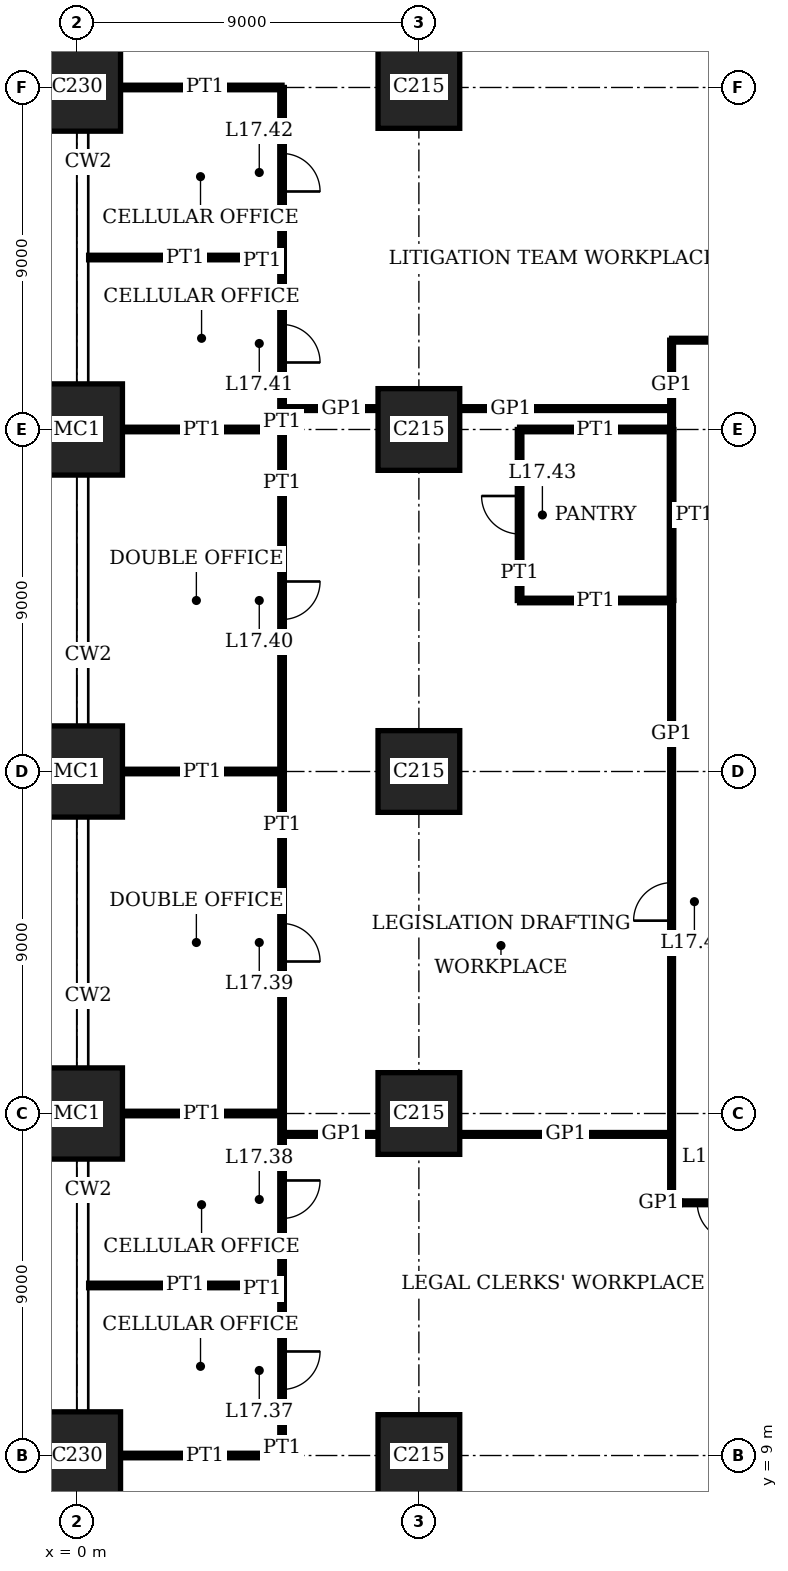
"""IFC4 building model, lengths in metres.
Left out: names, types, materials, properties, quantities, classifications, styles, units other than length and angle.
Written with IfcOpenShell. Run it as: python <this file> out.ifc"""

import sys

from ifc_helpers import new_model, si_unit, direction, frame, frame_2d, origin, origin_2d, place, context, subcontext, project, spatial, rectangle, extrude, element, fill, save


model = new_model("IFC4")
c1 = context("Model", 3, precision=1e-05, world=origin(), true_north=direction((0.0, 1.0)))
c2 = subcontext(c1, "Body", "Model", "MODEL_VIEW")
j1 = project(units=[si_unit("LENGTHUNIT", "METRE"), si_unit("PLANEANGLEUNIT", "RADIAN")], contexts=[c1])
p1 = place(None, origin())
s1 = spatial("IfcSite", under=j1, at=p1, CompositionType="ELEMENT")
p2 = place(p1, origin())
s2 = spatial("IfcBuilding", under=s1, at=p2, CompositionType="ELEMENT")
p3 = place(p2, frame((0.0, 0.0, 71.8)))
s3 = spatial("IfcBuildingStorey", under=s2, at=p3, CompositionType="ELEMENT", Elevation=71.8)
p4 = place(p3, frame((0.0, 9.0, 0.0), z_axis=(0.0, 0.0, 1.0), x_axis=(1.0, 0.0, 0.0)))
e1 = element("IfcColumn", 1, at=p4, inside=s3, PredefinedType="COLUMN", context=c2, shape_type="SweptSolid", body=[
    extrude(rectangle(XDim=2.3, YDim=2.3, at=origin_2d()), origin(), (0.0, 0.0, 1.0), 4.0),
])
for number, where, z_axis, x_axis in (
    (2, (0.0, 18.0, 0.0), (0.0, 0.0, 1.0), (1.0, 0.0, 0.0)),
    (3, (0.0, 27.0, 0.0), (0.0, 0.0, 1.0), (1.0, 0.0, 0.0)),
    (4, (0.0, 36.0, 0.0), (0.0, 0.0, 1.0), (1.0, 0.0, 0.0)),
):
    element("IfcColumn", number, at=place(p3, frame(where, z_axis=z_axis, x_axis=x_axis)), inside=s3, PredefinedType="COLUMN", context=c2, shape_type="SweptSolid", body=[
        extrude(rectangle(XDim=2.4, YDim=2.4, at=origin_2d()), origin(), (0.0, 0.0, 1.0), 4.0),
    ])
p5 = place(p3, frame((0.0, 45.0, 0.0), z_axis=(0.0, 0.0, 1.0), x_axis=(1.0, 0.0, 0.0)))
e5 = element("IfcColumn", 5, at=p5, inside=s3, PredefinedType="COLUMN", context=c2, shape_type="SweptSolid", body=[
    extrude(rectangle(XDim=2.3, YDim=2.3, at=origin_2d()), origin(), (0.0, 0.0, 1.0), 4.0),
])
for number, where, z_axis, x_axis in (
    (6, (9.0, 9.0, 0.0), (0.0, 0.0, 1.0), (1.0, 0.0, 0.0)),
    (7, (9.0, 18.0, 0.0), (0.0, 0.0, 1.0), (1.0, 0.0, 0.0)),
    (8, (9.0, 27.0, 0.0), (0.0, 0.0, 1.0), (1.0, 0.0, 0.0)),
    (9, (9.0, 36.0, 0.0), (0.0, 0.0, 1.0), (1.0, 0.0, 0.0)),
    (10, (9.0, 45.0, 0.0), (0.0, 0.0, 1.0), (1.0, 0.0, 0.0)),
):
    element("IfcColumn", number, at=place(p3, frame(where, z_axis=z_axis, x_axis=x_axis)), inside=s3, PredefinedType="COLUMN", context=c2, shape_type="SweptSolid", body=[
        extrude(rectangle(XDim=2.15, YDim=2.15, at=origin_2d()), origin(), (0.0, 0.0, 1.0), 4.0),
    ])
p6 = place(p3, frame((1.15, 9.0, 0.0), z_axis=(0.0, 0.0, 1.0), x_axis=(1.0, 0.0, 0.0)))
e11 = element("IfcWall", 11, at=p6, inside=s3, PredefinedType="PARTITIONING", context=c2, shape_type="SweptSolid", body=[
    extrude(rectangle(XDim=4.25, YDim=0.12, at=frame_2d((2.125, 0.0))), origin(), (0.0, 0.0, 1.0), 3.05),
])
p7 = place(p3, frame((0.31, 13.475, 0.0), z_axis=(0.0, 0.0, 1.0), x_axis=(1.0, 0.0, 0.0)))
e12 = element("IfcWall", 12, at=p7, inside=s3, PredefinedType="PARTITIONING", context=c2, shape_type="SweptSolid", body=[
    extrude(rectangle(XDim=5.09, YDim=0.12, at=frame_2d((2.545, 0.0))), origin(), (0.0, 0.0, 1.0), 3.1),
])
p8 = place(p3, frame((15.65, 15.65, 0.0), z_axis=(0.0, 0.0, 1.0), x_axis=(1.0, 0.0, 0.0)))
e13 = element("IfcWall", 13, at=p8, inside=s3, PredefinedType="PARTITIONING", context=c2, shape_type="SweptSolid", body=[
    extrude(rectangle(XDim=2.35, YDim=0.1, at=frame_2d((1.175, 0.0))), origin(), (0.0, 0.0, 1.0), 3.75),
])
p9 = place(p8, frame((0.675, 0.0, 0.0)))
e14 = element("IfcOpeningElement", 14, at=p9, cuts=e13, PredefinedType="OPENING", context=c2, shape_type="SweptSolid", body=[
    extrude(rectangle(XDim=1.0, YDim=2.4, at=frame_2d((0.5, 1.2))), frame((0.0, 0.06, 0.0), z_axis=(0.0, -1.0, 0.0), x_axis=(1.0, 0.0, 0.0)), (0.0, 0.0, 1.0), 0.12),
])
p10 = place(p3, frame((5.39, 17.45, 0.0), z_axis=(0.0, 0.0, 1.0), x_axis=(1.0, 0.0, 0.0)))
e15 = element("IfcWall", 15, at=p10, inside=s3, PredefinedType="PARTITIONING", context=c2, shape_type="SweptSolid", body=[
    extrude(rectangle(XDim=2.535, YDim=0.1, at=frame_2d((1.268, 0.0))), origin(), (0.0, 0.0, 1.0), 3.05),
])
p11 = place(p3, frame((10.075, 17.45, 0.0), z_axis=(0.0, 0.0, 1.0), x_axis=(1.0, 0.0, 0.0)))
e16 = element("IfcWall", 16, at=p11, inside=s3, PredefinedType="PARTITIONING", context=c2, shape_type="SweptSolid", body=[
    extrude(rectangle(XDim=5.575, YDim=0.1, at=frame_2d((2.788, 0.0))), origin(), (0.0, 0.0, 1.0), 3.05),
])
for number, where, z_axis, x_axis in (
    (17, (1.2, 18.0, 0.0), (0.0, 0.0, 1.0), (1.0, 0.0, 0.0)),
    (18, (1.2, 27.0, 0.0), (0.0, 0.0, 1.0), (1.0, 0.0, 0.0)),
):
    element("IfcWall", number, at=place(p3, frame(where, z_axis=z_axis, x_axis=x_axis)), inside=s3, PredefinedType="PARTITIONING", context=c2, shape_type="SweptSolid", body=[
        extrude(rectangle(XDim=4.2, YDim=0.12, at=frame_2d((2.1, 0.0))), origin(), (0.0, 0.0, 1.0), 3.05),
    ])
p12 = place(p3, frame((11.65, 31.5, 0.0), z_axis=(0.0, 0.0, 1.0), x_axis=(1.0, 0.0, 0.0)))
e19 = element("IfcWall", 19, at=p12, inside=s3, PredefinedType="PARTITIONING", context=c2, shape_type="SweptSolid", body=[
    extrude(rectangle(XDim=4.0, YDim=0.12, at=frame_2d((2.0, 0.0))), origin(), (0.0, 0.0, 1.0), 3.1),
])
p13 = place(p3, frame((1.2, 36.0, 0.0), z_axis=(0.0, 0.0, 1.0), x_axis=(1.0, 0.0, 0.0)))
e20 = element("IfcWall", 20, at=p13, inside=s3, PredefinedType="PARTITIONING", context=c2, shape_type="SweptSolid", body=[
    extrude(rectangle(XDim=4.2, YDim=0.12, at=frame_2d((2.1, 0.0))), origin(), (0.0, 0.0, 1.0), 3.05),
])
p14 = place(p3, frame((11.65, 36.0, 0.0), z_axis=(0.0, 0.0, 1.0), x_axis=(1.0, 0.0, 0.0)))
e21 = element("IfcWall", 21, at=p14, inside=s3, PredefinedType="PARTITIONING", context=c2, shape_type="SweptSolid", body=[
    extrude(rectangle(XDim=4.0, YDim=0.12, at=frame_2d((2.0, 0.0))), origin(), (0.0, 0.0, 1.0), 3.05),
])
p15 = place(p3, frame((5.39, 36.55, 0.0), z_axis=(0.0, 0.0, 1.0), x_axis=(1.0, 0.0, 0.0)))
e22 = element("IfcWall", 22, at=p15, inside=s3, PredefinedType="PARTITIONING", context=c2, shape_type="SweptSolid", body=[
    extrude(rectangle(XDim=2.535, YDim=0.1, at=frame_2d((1.268, 0.0))), origin(), (0.0, 0.0, 1.0), 3.05),
])
p16 = place(p3, frame((10.075, 36.55, 0.0), z_axis=(0.0, 0.0, 1.0), x_axis=(1.0, 0.0, 0.0)))
e23 = element("IfcWall", 23, at=p16, inside=s3, PredefinedType="PARTITIONING", context=c2, shape_type="SweptSolid", body=[
    extrude(rectangle(XDim=5.575, YDim=0.1, at=frame_2d((2.788, 0.0))), origin(), (0.0, 0.0, 1.0), 3.05),
])
p17 = place(p3, frame((15.65, 38.35, 0.0), z_axis=(0.0, 0.0, 1.0), x_axis=(1.0, 0.0, 0.0)))
e24 = element("IfcWall", 24, at=p17, inside=s3, PredefinedType="PARTITIONING", context=c2, shape_type="SweptSolid", body=[
    extrude(rectangle(XDim=15.85, YDim=0.1, at=frame_2d((7.925, 0.0))), origin(), (0.0, 0.0, 1.0), 3.75),
])
p18 = place(p17, frame((7.425, 0.0, 0.0)))
e25 = element("IfcOpeningElement", 25, at=p18, cuts=e24, PredefinedType="OPENING", context=c2, shape_type="SweptSolid", body=[
    extrude(rectangle(XDim=1.0, YDim=2.4, at=frame_2d((0.5, 1.2))), frame((0.0, 0.06, 0.0), z_axis=(0.0, -1.0, 0.0), x_axis=(1.0, 0.0, 0.0)), (0.0, 0.0, 1.0), 0.12),
])
p19 = place(p3, frame((0.31, 40.525, 0.0), z_axis=(0.0, 0.0, 1.0), x_axis=(1.0, 0.0, 0.0)))
e26 = element("IfcWall", 26, at=p19, inside=s3, PredefinedType="PARTITIONING", context=c2, shape_type="SweptSolid", body=[
    extrude(rectangle(XDim=5.09, YDim=0.12, at=frame_2d((2.545, 0.0))), origin(), (0.0, 0.0, 1.0), 3.1),
])
p20 = place(p3, frame((1.15, 45.0, 0.0), z_axis=(0.0, 0.0, 1.0), x_axis=(1.0, 0.0, 0.0)))
e27 = element("IfcWall", 27, at=p20, inside=s3, PredefinedType="PARTITIONING", context=c2, shape_type="SweptSolid", body=[
    extrude(rectangle(XDim=4.25, YDim=0.12, at=frame_2d((2.125, 0.0))), origin(), (0.0, 0.0, 1.0), 3.05),
])
p21 = place(p3, frame((5.4, 9.0, 0.0), z_axis=(0.0, 0.0, 1.0), x_axis=(0.0, 1.0, 0.0)))
e28 = element("IfcWall", 28, at=p21, inside=s3, PredefinedType="PARTITIONING", context=c2, shape_type="SweptSolid", body=[
    extrude(rectangle(XDim=4.475, YDim=0.12, at=frame_2d((2.238, 0.0))), origin(), (0.0, 0.0, 1.0), 3.75),
])
p22 = place(p21, frame((1.738, 0.0, 0.0)))
e29 = element("IfcOpeningElement", 29, at=p22, cuts=e28, PredefinedType="OPENING", context=c2, shape_type="SweptSolid", body=[
    extrude(rectangle(XDim=1.0, YDim=2.4, at=frame_2d((0.5, 1.2))), frame((0.0, 0.07, 0.0), z_axis=(0.0, -1.0, 0.0), x_axis=(1.0, 0.0, 0.0)), (0.0, 0.0, 1.0), 0.14),
])
p23 = place(p3, frame((5.4, 13.475, 0.0), z_axis=(0.0, 0.0, 1.0), x_axis=(0.0, 1.0, 0.0)))
e30 = element("IfcWall", 30, at=p23, inside=s3, PredefinedType="PARTITIONING", context=c2, shape_type="SweptSolid", body=[
    extrude(rectangle(XDim=4.525, YDim=0.12, at=frame_2d((2.262, 0.0))), origin(), (0.0, 0.0, 1.0), 3.75),
])
p24 = place(p23, frame((1.763, 0.0, 0.0)))
e31 = element("IfcOpeningElement", 31, at=p24, cuts=e30, PredefinedType="OPENING", context=c2, shape_type="SweptSolid", body=[
    extrude(rectangle(XDim=1.0, YDim=2.4, at=frame_2d((0.5, 1.2))), frame((0.0, 0.07, 0.0), z_axis=(0.0, -1.0, 0.0), x_axis=(1.0, 0.0, 0.0)), (0.0, 0.0, 1.0), 0.14),
])
p25 = place(p3, frame((5.4, 18.0, 0.0), z_axis=(0.0, 0.0, 1.0), x_axis=(0.0, 1.0, 0.0)))
e32 = element("IfcWall", 32, at=p25, inside=s3, PredefinedType="PARTITIONING", context=c2, shape_type="SweptSolid", body=[
    extrude(rectangle(XDim=9.0, YDim=0.12, at=frame_2d((4.5, 0.0))), origin(), (0.0, 0.0, 1.0), 3.75),
])
p26 = place(p25, frame((4.0, 0.0, 0.0)))
e33 = element("IfcOpeningElement", 33, at=p26, cuts=e32, PredefinedType="OPENING", context=c2, shape_type="SweptSolid", body=[
    extrude(rectangle(XDim=1.0, YDim=2.4, at=frame_2d((0.5, 1.2))), frame((0.0, 0.07, 0.0), z_axis=(0.0, -1.0, 0.0), x_axis=(1.0, 0.0, 0.0)), (0.0, 0.0, 1.0), 0.14),
])
p27 = place(p3, frame((5.4, 27.0, 0.0), z_axis=(0.0, 0.0, 1.0), x_axis=(0.0, 1.0, 0.0)))
e34 = element("IfcWall", 34, at=p27, inside=s3, PredefinedType="PARTITIONING", context=c2, shape_type="SweptSolid", body=[
    extrude(rectangle(XDim=9.0, YDim=0.12, at=frame_2d((4.5, 0.0))), origin(), (0.0, 0.0, 1.0), 3.75),
])
p28 = place(p27, frame((4.0, 0.0, 0.0)))
e35 = element("IfcOpeningElement", 35, at=p28, cuts=e34, PredefinedType="OPENING", context=c2, shape_type="SweptSolid", body=[
    extrude(rectangle(XDim=1.0, YDim=2.4, at=frame_2d((0.5, 1.2))), frame((0.0, 0.07, 0.0), z_axis=(0.0, -1.0, 0.0), x_axis=(1.0, 0.0, 0.0)), (0.0, 0.0, 1.0), 0.14),
])
p29 = place(p3, frame((5.4, 36.0, 0.0), z_axis=(0.0, 0.0, 1.0), x_axis=(0.0, 1.0, 0.0)))
e36 = element("IfcWall", 36, at=p29, inside=s3, PredefinedType="PARTITIONING", context=c2, shape_type="SweptSolid", body=[
    extrude(rectangle(XDim=4.525, YDim=0.12, at=frame_2d((2.262, 0.0))), origin(), (0.0, 0.0, 1.0), 3.75),
])
p30 = place(p29, frame((1.763, 0.0, 0.0)))
e37 = element("IfcOpeningElement", 37, at=p30, cuts=e36, PredefinedType="OPENING", context=c2, shape_type="SweptSolid", body=[
    extrude(rectangle(XDim=1.0, YDim=2.4, at=frame_2d((0.5, 1.2))), frame((0.0, 0.07, 0.0), z_axis=(0.0, -1.0, 0.0), x_axis=(1.0, 0.0, 0.0)), (0.0, 0.0, 1.0), 0.14),
])
p31 = place(p3, frame((5.4, 40.525, 0.0), z_axis=(0.0, 0.0, 1.0), x_axis=(0.0, 1.0, 0.0)))
e38 = element("IfcWall", 38, at=p31, inside=s3, PredefinedType="PARTITIONING", context=c2, shape_type="SweptSolid", body=[
    extrude(rectangle(XDim=4.475, YDim=0.12, at=frame_2d((2.238, 0.0))), origin(), (0.0, 0.0, 1.0), 3.75),
])
p32 = place(p31, frame((1.738, 0.0, 0.0)))
e39 = element("IfcOpeningElement", 39, at=p32, cuts=e38, PredefinedType="OPENING", context=c2, shape_type="SweptSolid", body=[
    extrude(rectangle(XDim=1.0, YDim=2.4, at=frame_2d((0.5, 1.2))), frame((0.0, 0.07, 0.0), z_axis=(0.0, -1.0, 0.0), x_axis=(1.0, 0.0, 0.0)), (0.0, 0.0, 1.0), 0.14),
])
p33 = place(p3, frame((11.65, 31.5, 0.0), z_axis=(0.0, 0.0, 1.0), x_axis=(0.0, 1.0, 0.0)))
e40 = element("IfcWall", 40, at=p33, inside=s3, PredefinedType="PARTITIONING", context=c2, shape_type="SweptSolid", body=[
    extrude(rectangle(XDim=4.5, YDim=0.12, at=frame_2d((2.25, 0.0))), origin(), (0.0, 0.0, 1.0), 3.75),
])
p34 = place(p33, frame((1.75, 0.0, 0.0)))
e41 = element("IfcOpeningElement", 41, at=p34, cuts=e40, PredefinedType="OPENING", context=c2, shape_type="SweptSolid", body=[
    extrude(rectangle(XDim=1.0, YDim=2.4, at=frame_2d((0.5, 1.2))), frame((0.0, 0.07, 0.0), z_axis=(0.0, -1.0, 0.0), x_axis=(1.0, 0.0, 0.0)), (0.0, 0.0, 1.0), 0.14),
])
p35 = place(p3, frame((15.65, 31.5, 0.0), z_axis=(0.0, 0.0, 1.0), x_axis=(0.0, 1.0, 0.0)))
e42 = element("IfcWall", 42, at=p35, inside=s3, PredefinedType="PARTITIONING", context=c2, shape_type="SweptSolid", body=[
    extrude(rectangle(XDim=4.5, YDim=0.12, at=frame_2d((2.25, 0.0))), origin(), (0.0, 0.0, 1.0), 3.75),
])
p36 = place(p3, frame((15.65, 15.65, 0.0), z_axis=(0.0, 0.0, 1.0), x_axis=(0.0, 1.0, 0.0)))
e43 = element("IfcWall", 43, at=p36, inside=s3, PredefinedType="PARTITIONING", context=c2, shape_type="SweptSolid", body=[
    extrude(rectangle(XDim=15.85, YDim=0.1, at=frame_2d((7.925, 0.0))), origin(), (0.0, 0.0, 1.0), 3.75),
])
p37 = place(p36, frame((7.425, 0.0, 0.0)))
e44 = element("IfcOpeningElement", 44, at=p37, cuts=e43, PredefinedType="OPENING", context=c2, shape_type="SweptSolid", body=[
    extrude(rectangle(XDim=1.0, YDim=2.4, at=frame_2d((0.5, 1.2))), frame((0.0, 0.06, 0.0), z_axis=(0.0, -1.0, 0.0), x_axis=(1.0, 0.0, 0.0)), (0.0, 0.0, 1.0), 0.12),
])
p38 = place(p3, frame((15.65, 36.0, 0.0), z_axis=(0.0, 0.0, 1.0), x_axis=(0.0, 1.0, 0.0)))
e45 = element("IfcWall", 45, at=p38, inside=s3, PredefinedType="PARTITIONING", context=c2, shape_type="SweptSolid", body=[
    extrude(rectangle(XDim=2.35, YDim=0.1, at=frame_2d((1.175, 0.0))), origin(), (0.0, 0.0, 1.0), 3.75),
])
p39 = place(p9, origin())
e46 = element("IfcDoor", 46, at=p39, inside=s3, OperationType="SINGLE_SWING_RIGHT", PredefinedType="DOOR", context=c2, shape_type="SweptSolid", body=[
    extrude(rectangle(XDim=1.0, YDim=2.4, at=frame_2d((0.5, 1.2))), frame((0.0, 0.02, 0.0), z_axis=(0.0, -1.0, 0.0), x_axis=(1.0, 0.0, 0.0)), (0.0, 0.0, 1.0), 0.04),
])
fill(e14, e46)
p40 = place(p22, origin())
e47 = element("IfcDoor", 47, at=p40, inside=s3, OperationType="SINGLE_SWING_RIGHT", PredefinedType="DOOR", context=c2, shape_type="SweptSolid", body=[
    extrude(rectangle(XDim=1.0, YDim=2.4, at=frame_2d((0.5, 1.2))), frame((0.0, 0.025, 0.0), z_axis=(0.0, -1.0, 0.0), x_axis=(1.0, 0.0, 0.0)), (0.0, 0.0, 1.0), 0.05),
])
fill(e29, e47)
p41 = place(p24, origin())
e48 = element("IfcDoor", 48, at=p41, inside=s3, OperationType="SINGLE_SWING_RIGHT", PredefinedType="DOOR", context=c2, shape_type="SweptSolid", body=[
    extrude(rectangle(XDim=1.0, YDim=2.4, at=frame_2d((0.5, 1.2))), frame((0.0, 0.025, 0.0), z_axis=(0.0, -1.0, 0.0), x_axis=(1.0, 0.0, 0.0)), (0.0, 0.0, 1.0), 0.05),
])
fill(e31, e48)
p42 = place(p26, origin())
e49 = element("IfcDoor", 49, at=p42, inside=s3, OperationType="SINGLE_SWING_LEFT", PredefinedType="DOOR", context=c2, shape_type="SweptSolid", body=[
    extrude(rectangle(XDim=1.0, YDim=2.4, at=frame_2d((0.5, 1.2))), frame((0.0, 0.025, 0.0), z_axis=(0.0, -1.0, 0.0), x_axis=(1.0, 0.0, 0.0)), (0.0, 0.0, 1.0), 0.05),
])
fill(e33, e49)
p43 = place(p28, origin())
e50 = element("IfcDoor", 50, at=p43, inside=s3, OperationType="SINGLE_SWING_RIGHT", PredefinedType="DOOR", context=c2, shape_type="SweptSolid", body=[
    extrude(rectangle(XDim=1.0, YDim=2.4, at=frame_2d((0.5, 1.2))), frame((0.0, 0.025, 0.0), z_axis=(0.0, -1.0, 0.0), x_axis=(1.0, 0.0, 0.0)), (0.0, 0.0, 1.0), 0.05),
])
fill(e35, e50)
p44 = place(p30, origin())
e51 = element("IfcDoor", 51, at=p44, inside=s3, OperationType="SINGLE_SWING_LEFT", PredefinedType="DOOR", context=c2, shape_type="SweptSolid", body=[
    extrude(rectangle(XDim=1.0, YDim=2.4, at=frame_2d((0.5, 1.2))), frame((0.0, 0.025, 0.0), z_axis=(0.0, -1.0, 0.0), x_axis=(1.0, 0.0, 0.0)), (0.0, 0.0, 1.0), 0.05),
])
fill(e37, e51)
p45 = place(p32, origin())
e52 = element("IfcDoor", 52, at=p45, inside=s3, OperationType="SINGLE_SWING_LEFT", PredefinedType="DOOR", context=c2, shape_type="SweptSolid", body=[
    extrude(rectangle(XDim=1.0, YDim=2.4, at=frame_2d((0.5, 1.2))), frame((0.0, 0.025, 0.0), z_axis=(0.0, -1.0, 0.0), x_axis=(1.0, 0.0, 0.0)), (0.0, 0.0, 1.0), 0.05),
])
fill(e39, e52)
p46 = place(p34, origin())
e53 = element("IfcDoor", 53, at=p46, inside=s3, OperationType="SINGLE_SWING_LEFT", PredefinedType="DOOR", context=c2, shape_type="SweptSolid", body=[
    extrude(rectangle(XDim=1.0, YDim=2.4, at=frame_2d((0.5, 1.2))), frame((0.0, 0.025, 0.0), z_axis=(0.0, -1.0, 0.0), x_axis=(1.0, 0.0, 0.0)), (0.0, 0.0, 1.0), 0.05),
])
fill(e41, e53)
p47 = place(p37, origin())
e54 = element("IfcDoor", 54, at=p47, inside=s3, OperationType="SINGLE_SWING_RIGHT", PredefinedType="DOOR", context=c2, shape_type="SweptSolid", body=[
    extrude(rectangle(XDim=1.0, YDim=2.4, at=frame_2d((0.5, 1.2))), frame((0.0, 0.02, 0.0), z_axis=(0.0, -1.0, 0.0), x_axis=(1.0, 0.0, 0.0)), (0.0, 0.0, 1.0), 0.04),
])
fill(e44, e54)
save(model, sys.argv[1])
